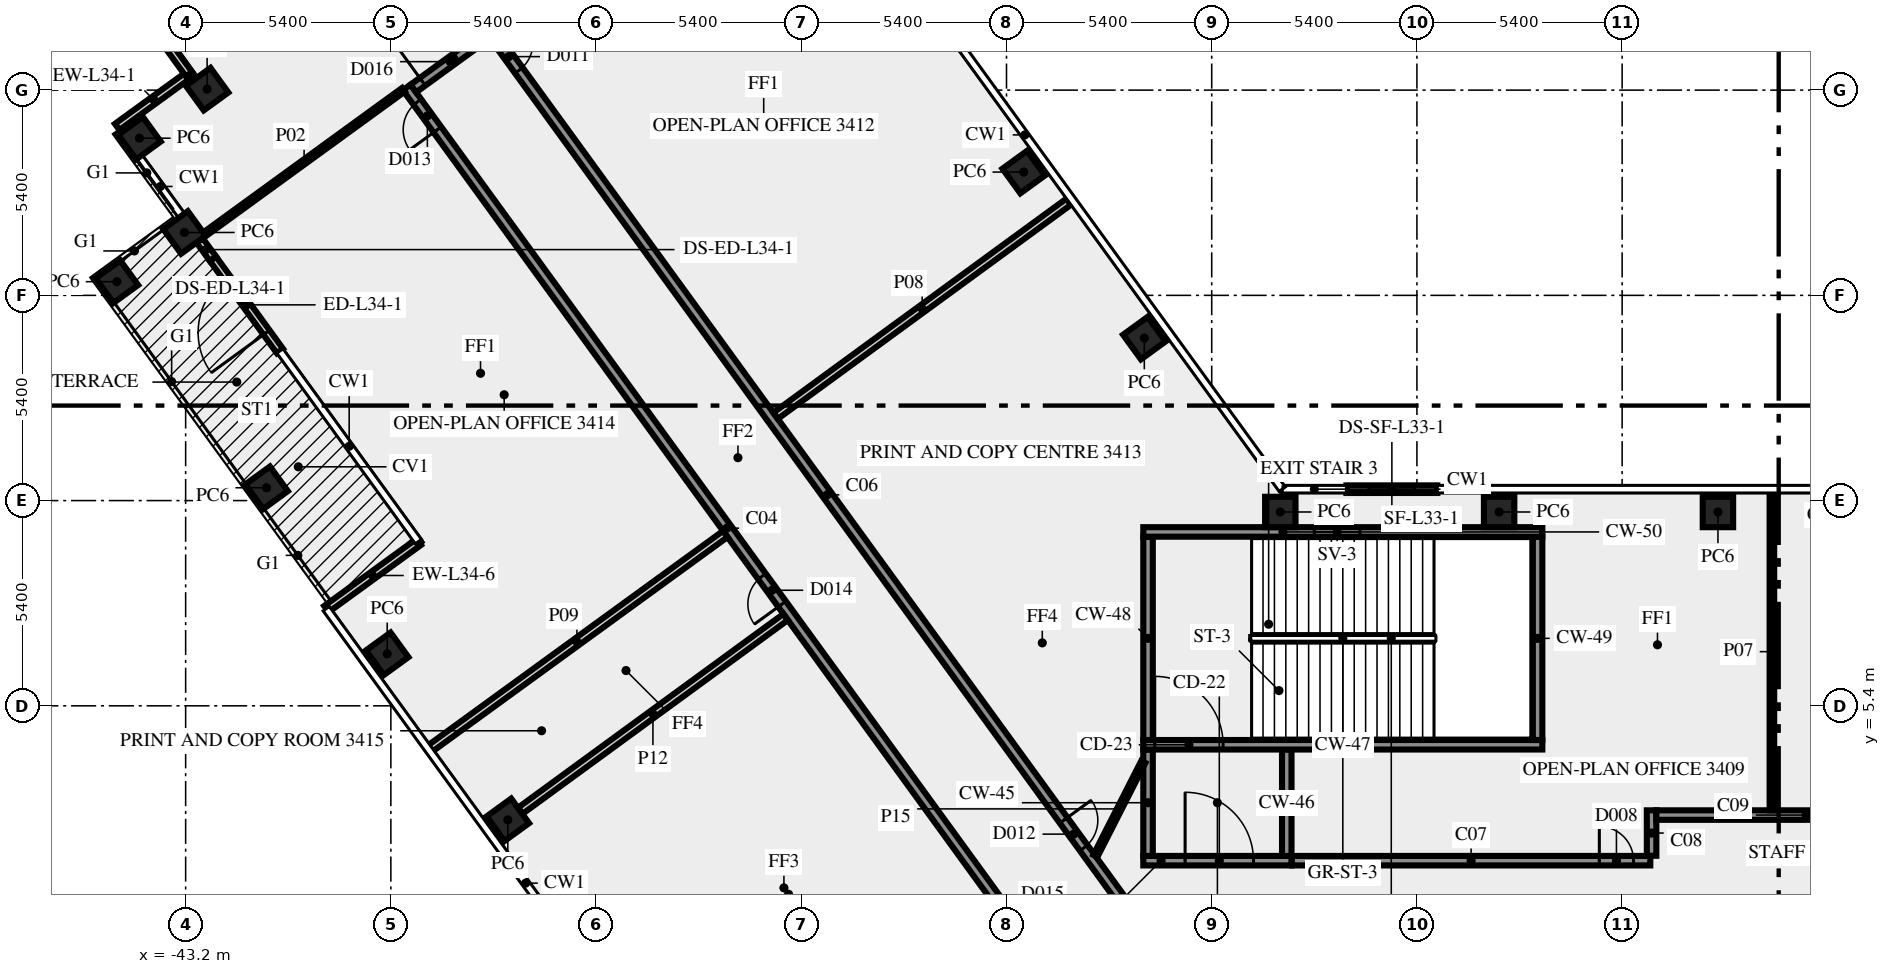
"""IFC4 building model, lengths in metres.
Left out: names, types, materials, properties, quantities, classifications, styles, units other than length and angle.
Written with IfcOpenShell. Run it as: python <this file> out.ifc"""

import sys

from ifc_helpers import new_model, si_unit, direction, frame, frame_2d, origin, origin_2d, place, context, subcontext, project, spatial, rectangle, extrude, element, fill, save


model = new_model("IFC4")
c1 = context("Model", 3, precision=1e-05, world=origin(), true_north=direction((0.0, 1.0)))
c2 = subcontext(c1, "Body", "Model", "MODEL_VIEW")
j1 = project(units=[si_unit("LENGTHUNIT", "METRE"), si_unit("PLANEANGLEUNIT", "RADIAN")], contexts=[c1])
p1 = place(None, origin())
s1 = spatial("IfcSite", under=j1, at=p1, CompositionType="ELEMENT")
p2 = place(p1, origin())
s2 = spatial("IfcBuilding", under=s1, at=p2, CompositionType="ELEMENT")
p3 = place(p2, frame((0.0, 0.0, 148.0)))
s3 = spatial("IfcBuildingStorey", under=s2, at=p3, CompositionType="ELEMENT", Elevation=148.0)
for number, where, z_axis, x_axis in (
    (1, (-17.974, 15.075, 0.0), (0.0, 0.0, 1.0), (-0.588, 0.809, 0.0)),
    (2, (-21.147, 19.444, 0.0), (0.0, 0.0, 1.0), (-0.588, 0.809, 0.0)),
    (3, (-42.635, 21.626, 0.0), (0.0, 0.0, 1.0), (-0.809, -0.588, 0.0)),
    (4, (-44.415, 20.335, 0.0), (0.0, 0.0, 1.0), (0.588, -0.809, 0.0)),
    (5, (-43.231, 17.854, 0.0), (0.0, 0.0, 1.0), (0.588, -0.809, 0.0)),
    (6, (-45.01, 16.56, 0.0), (0.0, 0.0, 1.0), (0.588, -0.809, 0.0)),
    (7, (-41.07, 11.137, 0.0), (0.0, 0.0, 1.0), (0.588, -0.809, 0.0)),
    (8, (-37.896, 6.769, 0.0), (0.0, 0.0, 1.0), (0.588, -0.809, 0.0)),
    (9, (-34.722, 2.4, 0.0), (0.0, 0.0, 1.0), (0.588, -0.809, 0.0)),
    (10, (-2.879, 10.5, 0.0), (0.0, 0.0, 1.0), (-1.0, 0.0, 0.0)),
    (11, (-8.637, 10.5, 0.0), (0.0, 0.0, 1.0), (-1.0, 0.0, 0.0)),
    (12, (-14.395, 10.5, 0.0), (0.0, 0.0, 1.0), (-1.0, 0.0, 0.0)),
):
    element("IfcColumn", number, at=place(p3, frame(where, z_axis=z_axis, x_axis=x_axis)), inside=s3, PredefinedType="COLUMN", context=c2, shape_type="SweptSolid", body=[
        extrude(rectangle(XDim=0.8, YDim=0.8, at=origin_2d()), origin(), (0.0, 0.0, 1.0), 3.65),
    ])
p4 = place(p3, frame((-43.061, 22.043, 0.0), z_axis=(0.0, 0.0, 1.0), x_axis=(-0.809026317077, -0.587772420479, 0.0)))
e13 = element("IfcWall", 13, at=p4, inside=s3, PredefinedType="SOLIDWALL", context=c2, shape_type="SweptSolid", body=[
    extrude(rectangle(XDim=2.4, YDim=0.2, at=frame_2d((1.2, 0.0))), origin(), (0.0, 0.0, 1.0), 3.65),
])
p5 = place(p3, frame((-40.719, 14.737, 0.0), z_axis=(0.0, 0.0, 1.0), x_axis=(-0.587808727036, 0.808999938455, 0.0)))
e14 = element("IfcWall", 14, at=p5, inside=s3, PredefinedType="SOLIDWALL", context=c2, shape_type="SweptSolid", body=[
    extrude(rectangle(XDim=3.0, YDim=0.2, at=frame_2d((1.5, 0.0))), origin(), (0.0, 0.0, 1.0), 3.65),
])
p6 = place(p5, frame((0.6, 0.0, 0.0)))
e15 = element("IfcOpeningElement", 15, at=p6, cuts=e14, PredefinedType="OPENING", context=c2, shape_type="SweptSolid", body=[
    extrude(rectangle(XDim=1.8, YDim=2.4, at=frame_2d((0.9, 1.2))), frame((0.0, 0.11, 0.0), z_axis=(0.0, -1.0, 0.0), x_axis=(1.0, 0.0, 0.0)), (0.0, 0.0, 1.0), 0.22),
])
p7 = place(p3, frame((-37.067, 9.711, 0.0), z_axis=(0.0, 0.0, 1.0), x_axis=(-0.808999938455, -0.587808727036, 0.0)))
e16 = element("IfcWall", 16, at=p7, inside=s3, PredefinedType="SOLIDWALL", context=c2, shape_type="SweptSolid", body=[
    extrude(rectangle(XDim=3.0, YDim=0.2, at=frame_2d((1.5, 0.0))), origin(), (0.0, 0.0, 1.0), 3.65),
])
p8 = place(p3, frame((-10.263, 11.1, 0.0), z_axis=(0.0, 0.0, 1.0), x_axis=(-1.0, 0.0, 0.0)))
e17 = element("IfcWall", 17, at=p8, inside=s3, PredefinedType="SOLIDWALL", context=c2, shape_type="SweptSolid", body=[
    extrude(rectangle(XDim=2.392, YDim=0.2, at=frame_2d((1.196, 0.0))), origin(), (0.0, 0.0, 1.0), 3.65),
])
p9 = place(p8, frame((0.596, 0.0, 1.0)))
e18 = element("IfcOpeningElement", 18, at=p9, cuts=e17, PredefinedType="OPENING", context=c2, shape_type="SweptSolid", body=[
    extrude(rectangle(XDim=1.2, YDim=1.2, at=frame_2d((0.6, 0.6))), frame((0.0, 0.11, 0.0), z_axis=(0.0, -1.0, 0.0), x_axis=(1.0, 0.0, 0.0)), (0.0, 0.0, 1.0), 0.22),
])
p10 = place(p3, frame((-44.699, 24.205, 0.0), z_axis=(0.0, 0.0, 1.0), x_axis=(0.587762999008, -0.809033161865, 0.0)))
e19 = element("IfcWall", 19, at=p10, inside=s3, PredefinedType="SOLIDWALL", context=c2, shape_type="SweptSolid", body=[
    extrude(rectangle(XDim=2.7, YDim=0.2, at=frame_2d((1.35, 0.0))), origin(), (0.0, 0.0, 1.0), 3.65),
])
p11 = place(p3, frame((-18.0, 1.325, 0.0), z_axis=(0.0, 0.0, 1.0), x_axis=(1.0, 0.0, 0.0)))
e20 = element("IfcWall", 20, at=p11, inside=s3, PredefinedType="SHEAR", context=c2, shape_type="SweptSolid", body=[
    extrude(rectangle(XDim=3.9, YDim=0.25, at=frame_2d((1.95, 0.0))), origin(), (0.0, 0.0, 1.0), 3.65),
])
p12 = place(p11, frame((1.1, 0.0, 0.0)))
e21 = element("IfcOpeningElement", 21, at=p12, cuts=e20, PredefinedType="OPENING", context=c2, shape_type="SweptSolid", body=[
    extrude(rectangle(XDim=1.8, YDim=2.1, at=frame_2d((0.9, 1.05))), frame((0.0, 0.135, 0.0), z_axis=(0.0, -1.0, 0.0), x_axis=(1.0, 0.0, 0.0)), (0.0, 0.0, 1.0), 0.27),
])
for number, where, z_axis, x_axis in (
    (22, (-17.875, 1.45, 0.0), (0.0, 0.0, 1.0), (0.0, 1.0, 0.0)),
    (23, (-14.225, 1.45, 0.0), (0.0, 0.0, 1.0), (0.0, 1.0, 0.0)),
):
    element("IfcWall", number, at=place(p3, frame(where, z_axis=z_axis, x_axis=x_axis)), inside=s3, PredefinedType="SHEAR", context=c2, shape_type="SweptSolid", body=[
        extrude(rectangle(XDim=2.8, YDim=0.25, at=frame_2d((1.4, 0.0))), origin(), (0.0, 0.0, 1.0), 3.65),
    ])
p13 = place(p3, frame((-18.0, 4.375, 0.0), z_axis=(0.0, 0.0, 1.0), x_axis=(1.0, 0.0, 0.0)))
e24 = element("IfcWall", 24, at=p13, inside=s3, PredefinedType="SHEAR", context=c2, shape_type="SweptSolid", body=[
    extrude(rectangle(XDim=10.5, YDim=0.25, at=frame_2d((5.25, 0.0))), origin(), (0.0, 0.0, 1.0), 3.65),
])
p14 = place(p13, frame((0.3, 0.0, 0.0)))
e25 = element("IfcOpeningElement", 25, at=p14, cuts=e24, PredefinedType="OPENING", context=c2, shape_type="SweptSolid", body=[
    extrude(rectangle(XDim=1.8, YDim=2.1, at=frame_2d((0.9, 1.05))), frame((0.0, 0.135, 0.0), z_axis=(0.0, -1.0, 0.0), x_axis=(1.0, 0.0, 0.0)), (0.0, 0.0, 1.0), 0.27),
])
for number, where, z_axis, x_axis in (
    (26, (-17.875, 4.5, 0.0), (0.0, 0.0, 1.0), (0.0, 1.0, 0.0)),
    (27, (-7.625, 4.5, 0.0), (0.0, 0.0, 1.0), (0.0, 1.0, 0.0)),
):
    element("IfcWall", number, at=place(p3, frame(where, z_axis=z_axis, x_axis=x_axis)), inside=s3, PredefinedType="SHEAR", context=c2, shape_type="SweptSolid", body=[
        extrude(rectangle(XDim=5.35, YDim=0.25, at=frame_2d((2.675, 0.0))), origin(), (0.0, 0.0, 1.0), 3.65),
    ])
p15 = place(p3, frame((-18.0, 9.975, 0.0), z_axis=(0.0, 0.0, 1.0), x_axis=(1.0, 0.0, 0.0)))
e28 = element("IfcWall", 28, at=p15, inside=s3, PredefinedType="SHEAR", context=c2, shape_type="SweptSolid", body=[
    extrude(rectangle(XDim=10.5, YDim=0.25, at=frame_2d((5.25, 0.0))), origin(), (0.0, 0.0, 1.0), 3.65),
])
p16 = place(p15, frame((4.5, 0.0, 1.0)))
e29 = element("IfcOpeningElement", 29, at=p16, cuts=e28, PredefinedType="OPENING", context=c2, shape_type="SweptSolid", body=[
    extrude(rectangle(XDim=1.2, YDim=1.2, at=frame_2d((0.6, 0.6))), frame((0.0, 0.135, 0.0), z_axis=(0.0, -1.0, 0.0), x_axis=(1.0, 0.0, 0.0)), (0.0, 0.0, 1.0), 0.27),
])
p17 = place(p3, frame((-20.531, -1.523, 0.0), z_axis=(0.0, 0.0, 1.0), x_axis=(-0.587785812891, 0.809016587076, 0.0)))
e30 = element("IfcWall", 30, at=p17, inside=s3, PredefinedType="SOLIDWALL", context=c2, shape_type="SweptSolid", body=[
    extrude(rectangle(XDim=28.67, YDim=0.25, at=frame_2d((14.335, 0.0))), origin(), (0.0, 0.0, 1.0), 3.65),
])
p18 = place(p17, frame((27.296, 0.0, 0.0)))
e31 = element("IfcOpeningElement", 31, at=p18, cuts=e30, PredefinedType="OPENING", context=c2, shape_type="SweptSolid", body=[
    extrude(rectangle(XDim=0.9, YDim=2.1, at=frame_2d((0.45, 1.05))), frame((0.0, 0.135, 0.0), z_axis=(0.0, -1.0, 0.0), x_axis=(1.0, 0.0, 0.0)), (0.0, 0.0, 1.0), 0.27),
])
p19 = place(p17, frame((11.866, 0.0, 0.0)))
e32 = element("IfcOpeningElement", 32, at=p19, cuts=e30, PredefinedType="OPENING", context=c2, shape_type="SweptSolid", body=[
    extrude(rectangle(XDim=0.9, YDim=2.1, at=frame_2d((0.45, 1.05))), frame((0.0, 0.135, 0.0), z_axis=(0.0, -1.0, 0.0), x_axis=(1.0, 0.0, 0.0)), (0.0, 0.0, 1.0), 0.27),
])
p20 = place(p17, frame((0.533, 0.0, 0.0)))
e33 = element("IfcOpeningElement", 33, at=p20, cuts=e30, PredefinedType="OPENING", context=c2, shape_type="SweptSolid", body=[
    extrude(rectangle(XDim=0.9, YDim=2.1, at=frame_2d((0.45, 1.05))), frame((0.0, 0.135, 0.0), z_axis=(0.0, -1.0, 0.0), x_axis=(1.0, 0.0, 0.0)), (0.0, 0.0, 1.0), 0.27),
])
p21 = place(p3, frame((-37.208, 21.644, 0.0), z_axis=(0.0, 0.0, 1.0), x_axis=(0.809038743598, 0.587755315891, 0.0)))
e34 = element("IfcWall", 34, at=p21, inside=s3, PredefinedType="SOLIDWALL", context=c2, shape_type="SweptSolid", body=[
    extrude(rectangle(XDim=2.65, YDim=0.25, at=frame_2d((1.325, 0.0))), origin(), (0.0, 0.0, 1.0), 3.65),
])
p22 = place(p21, frame((0.3, 0.0, 0.0)))
e35 = element("IfcOpeningElement", 35, at=p22, cuts=e34, PredefinedType="OPENING", context=c2, shape_type="SweptSolid", body=[
    extrude(rectangle(XDim=1.8, YDim=2.1, at=frame_2d((0.9, 1.05))), frame((0.0, 0.135, 0.0), z_axis=(0.0, -1.0, 0.0), x_axis=(1.0, 0.0, 0.0)), (0.0, 0.0, 1.0), 0.27),
])
p23 = place(p3, frame((-35.092, 23.027, 0.0), z_axis=(0.0, 0.0, 1.0), x_axis=(0.587784076945, -0.809017848313, 0.0)))
e36 = element("IfcWall", 36, at=p23, inside=s3, PredefinedType="SOLIDWALL", context=c2, shape_type="SweptSolid", body=[
    extrude(rectangle(XDim=29.853, YDim=0.25, at=frame_2d((14.927, 0.0))), origin(), (0.0, 0.0, 1.0), 3.65),
])
p24 = place(p23, frame((0.224, 0.0, 0.0)))
e37 = element("IfcOpeningElement", 37, at=p24, cuts=e36, PredefinedType="OPENING", context=c2, shape_type="SweptSolid", body=[
    extrude(rectangle(XDim=0.9, YDim=2.1, at=frame_2d((0.45, 1.05))), frame((0.0, 0.135, 0.0), z_axis=(0.0, -1.0, 0.0), x_axis=(1.0, 0.0, 0.0)), (0.0, 0.0, 1.0), 0.27),
])
p25 = place(p23, frame((25.512, 0.0, 0.0)))
e38 = element("IfcOpeningElement", 38, at=p25, cuts=e36, PredefinedType="OPENING", context=c2, shape_type="SweptSolid", body=[
    extrude(rectangle(XDim=0.9, YDim=2.1, at=frame_2d((0.45, 1.05))), frame((0.0, 0.135, 0.0), z_axis=(0.0, -1.0, 0.0), x_axis=(1.0, 0.0, 0.0)), (0.0, 0.0, 1.0), 0.27),
])
p26 = place(p3, frame((-14.09, 1.325, 0.0), z_axis=(0.0, 0.0, 1.0), x_axis=(1.0, 0.0, 0.0)))
e39 = element("IfcWall", 39, at=p26, inside=s3, PredefinedType="SOLIDWALL", context=c2, shape_type="SweptSolid", body=[
    extrude(rectangle(XDim=9.431, YDim=0.25, at=frame_2d((4.716, 0.0))), origin(), (0.0, 0.0, 1.0), 3.65),
])
p27 = place(p26, frame((8.09, 0.0, 0.0)))
e40 = element("IfcOpeningElement", 40, at=p27, cuts=e39, PredefinedType="OPENING", context=c2, shape_type="SweptSolid", body=[
    extrude(rectangle(XDim=0.9, YDim=2.1, at=frame_2d((0.45, 1.05))), frame((0.0, 0.135, 0.0), z_axis=(0.0, -1.0, 0.0), x_axis=(1.0, 0.0, 0.0)), (0.0, 0.0, 1.0), 0.27),
])
p28 = place(p3, frame((-4.625, 1.454, 0.0), z_axis=(0.0, 0.0, 1.0), x_axis=(0.0, 1.0, 0.0)))
e41 = element("IfcWall", 41, at=p28, inside=s3, PredefinedType="SOLIDWALL", context=c2, shape_type="SweptSolid", body=[
    extrude(rectangle(XDim=1.196, YDim=0.25, at=frame_2d((0.598, 0.0))), origin(), (0.0, 0.0, 1.0), 3.65),
])
p29 = place(p3, frame((-4.5, 2.525, 0.0), z_axis=(0.0, 0.0, 1.0), x_axis=(1.0, 0.0, 0.0)))
e42 = element("IfcWall", 42, at=p29, inside=s3, PredefinedType="SOLIDWALL", context=c2, shape_type="SweptSolid", body=[
    extrude(rectangle(XDim=11.25, YDim=0.25, at=frame_2d((5.625, 0.0))), origin(), (0.0, 0.0, 1.0), 3.65),
])
p30 = place(p29, frame((4.689, 0.0, 0.0)))
e43 = element("IfcOpeningElement", 43, at=p30, cuts=e42, PredefinedType="OPENING", context=c2, shape_type="SweptSolid", body=[
    extrude(rectangle(XDim=0.9, YDim=2.1, at=frame_2d((0.45, 1.05))), frame((0.0, 0.135, 0.0), z_axis=(0.0, -1.0, 0.0), x_axis=(1.0, 0.0, 0.0)), (0.0, 0.0, 1.0), 0.27),
])
p31 = place(p3, frame((-42.698, 17.81, 0.0), z_axis=(0.0, 0.0, 1.0), x_axis=(0.80901688725, 0.587785399737, 0.0)))
e44 = element("IfcWall", 44, at=p31, inside=s3, PredefinedType="PARTITIONING", context=c2, shape_type="SweptSolid", body=[
    extrude(rectangle(XDim=6.465, YDim=0.12, at=frame_2d((3.232, 0.0))), origin(), (0.0, 0.0, 1.0), 3.65),
])
p32 = place(p3, frame((-1.459, 2.65, 0.0), z_axis=(0.0, 0.0, 1.0), x_axis=(0.0, 1.0, 0.0)))
e45 = element("IfcWall", 45, at=p32, inside=s3, PredefinedType="PARTITIONING", context=c2, shape_type="SweptSolid", body=[
    extrude(rectangle(XDim=8.35, YDim=0.12, at=frame_2d((4.175, 0.0))), origin(), (0.0, 0.0, 1.0), 2.85),
])
p33 = place(p3, frame((-27.676, 13.032, 0.0), z_axis=(0.0, 0.0, 1.0), x_axis=(0.807606997933, 0.589721067023, 0.0)))
e46 = element("IfcWall", 46, at=p33, inside=s3, PredefinedType="SOLIDWALL", context=c2, shape_type="SweptSolid", body=[
    extrude(rectangle(XDim=9.55, YDim=0.2, at=frame_2d((4.775, 0.0))), origin(), (0.0, 0.0, 1.0), 2.85),
])
p34 = place(p3, frame((-36.807, 4.247, 0.0), z_axis=(0.0, 0.0, 1.0), x_axis=(0.809002920164, 0.587804623294, 0.0)))
e47 = element("IfcWall", 47, at=p34, inside=s3, PredefinedType="SOLIDWALL", context=c2, shape_type="SweptSolid", body=[
    extrude(rectangle(XDim=9.651, YDim=0.2, at=frame_2d((4.825, 0.0))), origin(), (0.0, 0.0, 1.0), 2.85),
])
p35 = place(p3, frame((-34.395, 2.638, 0.0), z_axis=(0.0, 0.0, 1.0), x_axis=(0.807657534767, 0.589651851973, 0.0)))
e48 = element("IfcWall", 48, at=p35, inside=s3, PredefinedType="SOLIDWALL", context=c2, shape_type="SweptSolid", body=[
    extrude(rectangle(XDim=8.644, YDim=0.2, at=frame_2d((4.322, 0.0))), origin(), (0.0, 0.0, 1.0), 3.65),
])
p36 = place(p3, frame((-19.261, 1.45, 0.0), z_axis=(0.0, 0.0, 1.0), x_axis=(0.453950796792, 0.891026752736, 0.0)))
e49 = element("IfcWall", 49, at=p36, inside=s3, PredefinedType="PARTITIONING", context=c2, shape_type="SweptSolid", body=[
    extrude(rectangle(XDim=2.778, YDim=0.12, at=frame_2d((1.389, 0.0))), origin(), (0.0, 0.0, 1.0), 3.65),
])
p37 = place(p3, frame((-42.482, 17.164, 0.0), z_axis=(0.0, 0.0, 1.0), x_axis=(-0.5878294574, 0.808984875639, 0.0)))
e50 = element("IfcWall", 50, at=p37, inside=s3, PredefinedType="SOLIDWALL", context=c2, shape_type="SweptSolid", body=[
    extrude(rectangle(XDim=0.594, YDim=0.2, at=frame_2d((0.297, 0.0))), origin(), (0.0, 0.0, 1.0), 3.65),
])
p38 = place(p6, origin())
e51 = element("IfcDoor", 51, at=p38, inside=s3, OperationType="DOUBLE_DOOR_SINGLE_SWING", PredefinedType="DOOR", context=c2, shape_type="SweptSolid", body=[
    extrude(rectangle(XDim=1.8, YDim=2.4, at=frame_2d((0.9, 1.2))), frame((0.0, 0.025, 0.0), z_axis=(0.0, -1.0, 0.0), x_axis=(1.0, 0.0, 0.0)), (0.0, 0.0, 1.0), 0.05),
])
fill(e15, e51)
p39 = place(p9, origin())
e52 = element("IfcWindow", 52, at=p39, inside=s3, PartitioningType="SINGLE_PANEL", PredefinedType="WINDOW", context=c2, shape_type="SweptSolid", body=[
    extrude(rectangle(XDim=1.2, YDim=1.2, at=frame_2d((0.6, 0.6))), frame((0.0, 0.03, 0.0), z_axis=(0.0, -1.0, 0.0), x_axis=(1.0, 0.0, 0.0)), (0.0, 0.0, 1.0), 0.06),
])
fill(e18, e52)
p40 = place(p12, origin())
e53 = element("IfcDoor", 53, at=p40, inside=s3, OperationType="DOUBLE_DOOR_SINGLE_SWING", PredefinedType="DOOR", context=c2, shape_type="SweptSolid", body=[
    extrude(rectangle(XDim=1.8, YDim=2.1, at=frame_2d((0.9, 1.05))), frame((0.0, 0.025, 0.0), z_axis=(0.0, -1.0, 0.0), x_axis=(1.0, 0.0, 0.0)), (0.0, 0.0, 1.0), 0.05),
])
fill(e21, e53)
p41 = place(p14, origin())
e54 = element("IfcDoor", 54, at=p41, inside=s3, OperationType="DOUBLE_DOOR_SINGLE_SWING", PredefinedType="DOOR", context=c2, shape_type="SweptSolid", body=[
    extrude(rectangle(XDim=1.8, YDim=2.1, at=frame_2d((0.9, 1.05))), frame((0.0, 0.025, 0.0), z_axis=(0.0, -1.0, 0.0), x_axis=(1.0, 0.0, 0.0)), (0.0, 0.0, 1.0), 0.05),
])
fill(e25, e54)
p42 = place(p16, origin())
e55 = element("IfcWindow", 55, at=p42, inside=s3, PartitioningType="SINGLE_PANEL", PredefinedType="WINDOW", context=c2, shape_type="SweptSolid", body=[
    extrude(rectangle(XDim=1.2, YDim=1.2, at=frame_2d((0.6, 0.6))), frame((0.0, 0.03, 0.0), z_axis=(0.0, -1.0, 0.0), x_axis=(1.0, 0.0, 0.0)), (0.0, 0.0, 1.0), 0.06),
])
fill(e29, e55)
p43 = place(p22, origin())
e56 = element("IfcDoor", 56, at=p43, inside=s3, OperationType="DOUBLE_DOOR_SINGLE_SWING", PredefinedType="DOOR", context=c2, shape_type="SweptSolid", body=[
    extrude(rectangle(XDim=1.8, YDim=2.1, at=frame_2d((0.9, 1.05))), frame((0.0, 0.025, 0.0), z_axis=(0.0, -1.0, 0.0), x_axis=(1.0, 0.0, 0.0)), (0.0, 0.0, 1.0), 0.05),
])
fill(e35, e56)
p44 = place(p27, origin())
e57 = element("IfcDoor", 57, at=p44, inside=s3, OperationType="SINGLE_SWING_RIGHT", PredefinedType="DOOR", context=c2, shape_type="SweptSolid", body=[
    extrude(rectangle(XDim=0.9, YDim=2.1, at=frame_2d((0.45, 1.05))), frame((0.0, 0.025, 0.0), z_axis=(0.0, -1.0, 0.0), x_axis=(1.0, 0.0, 0.0)), (0.0, 0.0, 1.0), 0.05),
])
fill(e40, e57)
p45 = place(p24, origin())
e58 = element("IfcDoor", 58, at=p45, inside=s3, OperationType="SINGLE_SWING_LEFT", PredefinedType="DOOR", context=c2, shape_type="SweptSolid", body=[
    extrude(rectangle(XDim=0.9, YDim=2.1, at=frame_2d((0.45, 1.05))), frame((0.0, 0.025, 0.0), z_axis=(0.0, -1.0, 0.0), x_axis=(1.0, 0.0, 0.0)), (0.0, 0.0, 1.0), 0.05),
])
fill(e37, e58)
p46 = place(p18, origin())
e59 = element("IfcDoor", 59, at=p46, inside=s3, OperationType="SINGLE_SWING_RIGHT", PredefinedType="DOOR", context=c2, shape_type="SweptSolid", body=[
    extrude(rectangle(XDim=0.9, YDim=2.1, at=frame_2d((0.45, 1.05))), frame((0.0, 0.025, 0.0), z_axis=(0.0, -1.0, 0.0), x_axis=(1.0, 0.0, 0.0)), (0.0, 0.0, 1.0), 0.05),
])
fill(e31, e59)
p47 = place(p25, origin())
e60 = element("IfcDoor", 60, at=p47, inside=s3, OperationType="SINGLE_SWING_RIGHT", PredefinedType="DOOR", context=c2, shape_type="SweptSolid", body=[
    extrude(rectangle(XDim=0.9, YDim=2.1, at=frame_2d((0.45, 1.05))), frame((0.0, 0.025, 0.0), z_axis=(0.0, -1.0, 0.0), x_axis=(1.0, 0.0, 0.0)), (0.0, 0.0, 1.0), 0.05),
])
fill(e38, e60)
p48 = place(p19, origin())
e61 = element("IfcDoor", 61, at=p48, inside=s3, OperationType="SINGLE_SWING_LEFT", PredefinedType="DOOR", context=c2, shape_type="SweptSolid", body=[
    extrude(rectangle(XDim=0.9, YDim=2.1, at=frame_2d((0.45, 1.05))), frame((0.0, 0.025, 0.0), z_axis=(0.0, -1.0, 0.0), x_axis=(1.0, 0.0, 0.0)), (0.0, 0.0, 1.0), 0.05),
])
fill(e32, e61)
save(model, sys.argv[1])
